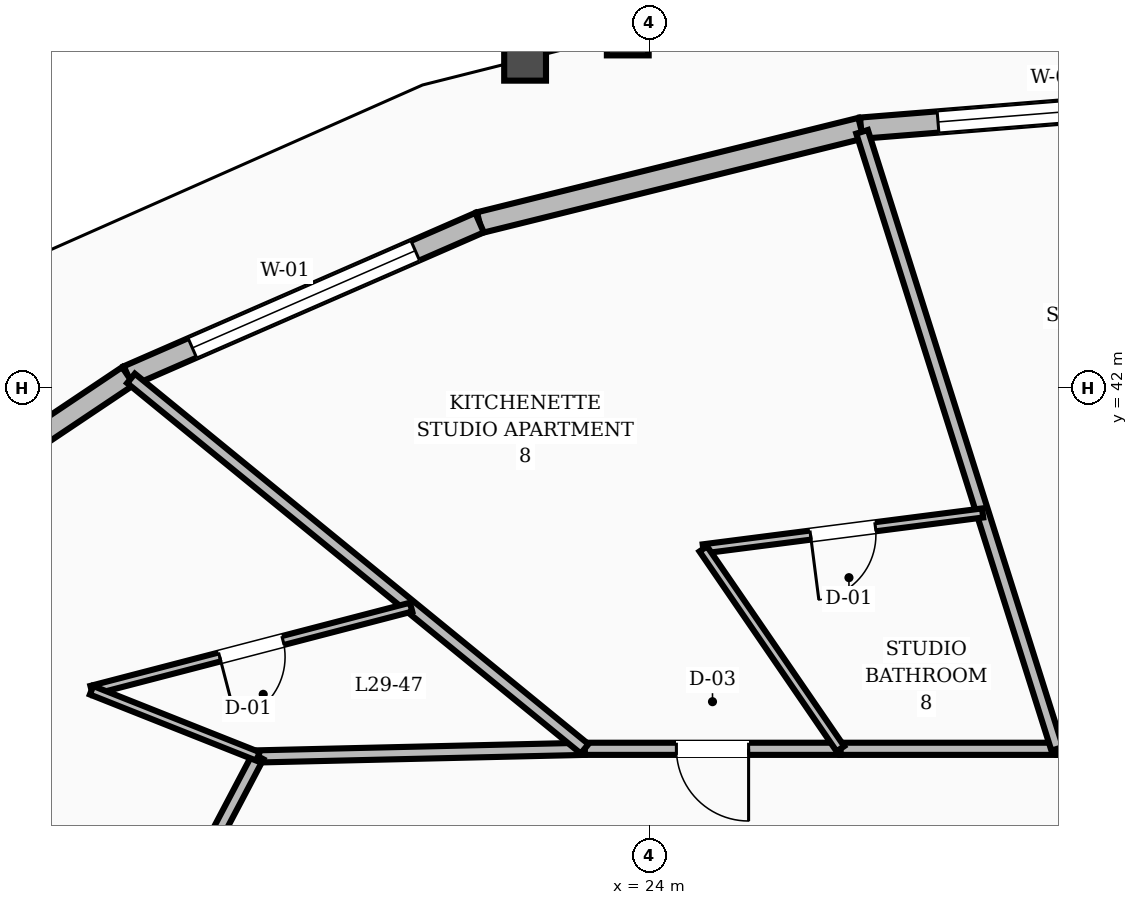
"""IFC4 building model, lengths in metres.
Left out: names, types, materials, properties, quantities, classifications, styles, units other than length and angle.
Written with IfcOpenShell. Run it as: python <this file> out.ifc"""

import sys

from ifc_helpers import new_model, si_unit, direction, frame, frame_2d, origin, place, context, subcontext, project, spatial, rectangle, extrude, element, fill, save


model = new_model("IFC4")
c1 = context("Model", 3, precision=1e-05, world=origin(), true_north=direction((0.0, 1.0)))
c2 = subcontext(c1, "Body", "Model", "MODEL_VIEW")
j1 = project(units=[si_unit("LENGTHUNIT", "METRE"), si_unit("PLANEANGLEUNIT", "RADIAN")], contexts=[c1])
p1 = place(None, origin())
s1 = spatial("IfcSite", under=j1, at=p1, CompositionType="ELEMENT")
p2 = place(p1, origin())
s2 = spatial("IfcBuilding", under=s1, at=p2, CompositionType="ELEMENT")
p3 = place(p2, frame((0.0, 0.0, 117.2)))
s3 = spatial("IfcBuildingStorey", under=s2, at=p3, CompositionType="ELEMENT", Elevation=117.2)
p4 = place(p3, frame((32.0, 45.835, 0.0), z_axis=(0.0, 0.0, 1.0), x_axis=(-0.996781229601, -0.080169696986, 0.0)))
e1 = element("IfcWall", 1, at=p4, inside=s3, PredefinedType="STANDARD", context=c2, shape_type="SweptSolid", body=[
    extrude(rectangle(XDim=5.235, YDim=0.28, at=frame_2d((2.617, 0.0))), origin(), (0.0, 0.0, 1.0), 2.82),
])
p5 = place(p4, frame((1.017, 0.0, 0.8)))
e2 = element("IfcOpeningElement", 2, at=p5, cuts=e1, PredefinedType="OPENING", context=c2, shape_type="SweptSolid", body=[
    extrude(rectangle(XDim=3.2, YDim=1.65, at=frame_2d((1.6, 0.825))), frame((0.0, 0.15, 0.0), z_axis=(0.0, -1.0, 0.0), x_axis=(1.0, 0.0, 0.0)), (0.0, 0.0, 1.0), 0.3),
])
p6 = place(p3, frame((26.782, 45.415, 0.0), z_axis=(0.0, 0.0, 1.0), x_axis=(-0.970681867926, -0.24036786657, 0.0)))
e3 = element("IfcWall", 3, at=p6, inside=s3, PredefinedType="STANDARD", context=c2, shape_type="SweptSolid", body=[
    extrude(rectangle(XDim=5.169, YDim=0.28, at=frame_2d((2.584, 0.0))), origin(), (0.0, 0.0, 1.0), 2.82),
])
p7 = place(p3, frame((21.765, 44.173, 0.0), z_axis=(0.0, 0.0, 1.0), x_axis=(-0.916542280899, -0.39993780432, 0.0)))
e4 = element("IfcWall", 4, at=p7, inside=s3, PredefinedType="STANDARD", context=c2, shape_type="SweptSolid", body=[
    extrude(rectangle(XDim=5.045, YDim=0.28, at=frame_2d((2.523, 0.0))), origin(), (0.0, 0.0, 1.0), 2.82),
])
p8 = place(p7, frame((0.923, 0.0, 0.8)))
e5 = element("IfcOpeningElement", 5, at=p8, cuts=e4, PredefinedType="OPENING", context=c2, shape_type="SweptSolid", body=[
    extrude(rectangle(XDim=3.2, YDim=1.65, at=frame_2d((1.6, 0.825))), frame((0.0, 0.15, 0.0), z_axis=(0.0, -1.0, 0.0), x_axis=(1.0, 0.0, 0.0)), (0.0, 0.0, 1.0), 0.3),
])
p9 = place(p3, frame((17.14, 42.155, 0.0), z_axis=(0.0, 0.0, 1.0), x_axis=(-0.830785482437, -0.556592743549, 0.0)))
e6 = element("IfcWall", 6, at=p9, inside=s3, PredefinedType="STANDARD", context=c2, shape_type="SweptSolid", body=[
    extrude(rectangle(XDim=4.878, YDim=0.28, at=frame_2d((2.439, 0.0))), origin(), (0.0, 0.0, 1.0), 2.82),
])
p10 = place(p3, frame((32.0, 37.25, 0.0), z_axis=(0.0, 0.0, 1.0), x_axis=(-1.0, 0.0, 0.0)))
e7 = element("IfcWall", 7, at=p10, inside=s3, PredefinedType="SOLIDWALL", context=c2, shape_type="SweptSolid", body=[
    extrude(rectangle(XDim=2.635, YDim=0.16, at=frame_2d((1.318, 0.0))), origin(), (0.0, 0.0, 1.0), 2.8),
])
p11 = place(p10, frame((0.843, 0.0, 0.0)))
e8 = element("IfcOpeningElement", 8, at=p11, cuts=e7, PredefinedType="OPENING", context=c2, shape_type="SweptSolid", body=[
    extrude(rectangle(XDim=0.95, YDim=2.1, at=frame_2d((0.475, 1.05))), frame((0.0, 0.09, 0.0), z_axis=(0.0, -1.0, 0.0), x_axis=(1.0, 0.0, 0.0)), (0.0, 0.0, 1.0), 0.18),
])
p12 = place(p3, frame((29.365, 37.25, 0.0), z_axis=(0.0, 0.0, 1.0), x_axis=(-1.0, 0.0, 0.0)))
e9 = element("IfcWall", 9, at=p12, inside=s3, PredefinedType="SOLIDWALL", context=c2, shape_type="SweptSolid", body=[
    extrude(rectangle(XDim=2.853, YDim=0.16, at=frame_2d((1.426, 0.0))), origin(), (0.0, 0.0, 1.0), 2.8),
])
p13 = place(p3, frame((26.512, 37.25, 0.0), z_axis=(0.0, 0.0, 1.0), x_axis=(-1.0, 0.0, 0.0)))
e10 = element("IfcWall", 10, at=p13, inside=s3, PredefinedType="SOLIDWALL", context=c2, shape_type="SweptSolid", body=[
    extrude(rectangle(XDim=3.365, YDim=0.16, at=frame_2d((1.683, 0.0))), origin(), (0.0, 0.0, 1.0), 2.8),
])
p14 = place(p13, frame((1.208, 0.0, 0.0)))
e11 = element("IfcOpeningElement", 11, at=p14, cuts=e10, PredefinedType="OPENING", context=c2, shape_type="SweptSolid", body=[
    extrude(rectangle(XDim=0.95, YDim=2.1, at=frame_2d((0.475, 1.05))), frame((0.0, 0.09, 0.0), z_axis=(0.0, -1.0, 0.0), x_axis=(1.0, 0.0, 0.0)), (0.0, 0.0, 1.0), 0.18),
])
p15 = place(p3, frame((23.146, 37.25, 0.0), z_axis=(0.0, 0.0, 1.0), x_axis=(-0.999728709658, -0.023291781507, 0.0)))
e12 = element("IfcWall", 12, at=p15, inside=s3, PredefinedType="SOLIDWALL", context=c2, shape_type="SweptSolid", body=[
    extrude(rectangle(XDim=4.298, YDim=0.16, at=frame_2d((2.149, 0.0))), origin(), (0.0, 0.0, 1.0), 2.8),
])
p16 = place(p3, frame((18.85, 37.15, 0.0), z_axis=(0.0, 0.0, 1.0), x_axis=(-0.466093963429, -0.884735224378, 0.0)))
e13 = element("IfcWall", 13, at=p16, inside=s3, PredefinedType="SOLIDWALL", context=c2, shape_type="SweptSolid", body=[
    extrude(rectangle(XDim=3.648, YDim=0.16, at=frame_2d((1.824, 0.0))), origin(), (0.0, 0.0, 1.0), 2.8),
])
p17 = place(p16, frame((1.349, 0.0, 0.0)))
e14 = element("IfcOpeningElement", 14, at=p17, cuts=e13, PredefinedType="OPENING", context=c2, shape_type="SweptSolid", body=[
    extrude(rectangle(XDim=0.95, YDim=2.1, at=frame_2d((0.475, 1.05))), frame((0.0, 0.09, 0.0), z_axis=(0.0, -1.0, 0.0), x_axis=(1.0, 0.0, 0.0)), (0.0, 0.0, 1.0), 0.18),
])
p18 = place(p3, frame((29.365, 37.25, 0.0), z_axis=(0.0, 0.0, 1.0), x_axis=(-0.301556782857, 0.953448219209, 0.0)))
e15 = element("IfcWall", 15, at=p18, inside=s3, PredefinedType="SOLIDWALL", context=c2, shape_type="SweptSolid", body=[
    extrude(rectangle(XDim=8.514, YDim=0.16, at=frame_2d((4.257, 0.0))), origin(), (0.0, 0.0, 1.0), 2.8),
])
p19 = place(p3, frame((28.383, 40.353, 0.0), z_axis=(0.0, 0.0, 1.0), x_axis=(-0.991848389459, -0.127423594076, 0.0)))
e16 = element("IfcWall", 16, at=p19, inside=s3, PredefinedType="PARTITIONING", context=c2, shape_type="SweptSolid", body=[
    extrude(rectangle(XDim=3.706, YDim=0.12, at=frame_2d((1.853, 0.0))), origin(), (0.0, 0.0, 1.0), 2.8),
])
p20 = place(p19, frame((1.423, 0.0, 0.0)))
e17 = element("IfcOpeningElement", 17, at=p20, cuts=e16, PredefinedType="OPENING", context=c2, shape_type="SweptSolid", body=[
    extrude(rectangle(XDim=0.86, YDim=2.1, at=frame_2d((0.43, 1.05))), frame((0.0, 0.07, 0.0), z_axis=(0.0, -1.0, 0.0), x_axis=(1.0, 0.0, 0.0)), (0.0, 0.0, 1.0), 0.14),
])
p21 = place(p3, frame((26.512, 37.25, 0.0), z_axis=(0.0, 0.0, 1.0), x_axis=(-0.565550666982, 0.824713552136, 0.0)))
e18 = element("IfcWall", 18, at=p21, inside=s3, PredefinedType="PARTITIONING", context=c2, shape_type="SweptSolid", body=[
    extrude(rectangle(XDim=3.19, YDim=0.12, at=frame_2d((1.595, 0.0))), origin(), (0.0, 0.0, 1.0), 2.8),
])
p22 = place(p3, frame((23.146, 37.25, 0.0), z_axis=(0.0, 0.0, 1.0), x_axis=(-0.774531610093, 0.632535204528, 0.0)))
e19 = element("IfcWall", 19, at=p22, inside=s3, PredefinedType="SOLIDWALL", context=c2, shape_type="SweptSolid", body=[
    extrude(rectangle(XDim=7.704, YDim=0.16, at=frame_2d((3.852, 0.0))), origin(), (0.0, 0.0, 1.0), 2.8),
])
p23 = place(p3, frame((20.864, 39.114, 0.0), z_axis=(0.0, 0.0, 1.0), x_axis=(-0.967784171798, -0.251781247947, 0.0)))
e20 = element("IfcWall", 20, at=p23, inside=s3, PredefinedType="PARTITIONING", context=c2, shape_type="SweptSolid", body=[
    extrude(rectangle(XDim=4.344, YDim=0.12, at=frame_2d((2.172, 0.0))), origin(), (0.0, 0.0, 1.0), 2.8),
])
p24 = place(p23, frame((1.742, 0.0, 0.0)))
e21 = element("IfcOpeningElement", 21, at=p24, cuts=e20, PredefinedType="OPENING", context=c2, shape_type="SweptSolid", body=[
    extrude(rectangle(XDim=0.86, YDim=2.1, at=frame_2d((0.43, 1.05))), frame((0.0, 0.07, 0.0), z_axis=(0.0, -1.0, 0.0), x_axis=(1.0, 0.0, 0.0)), (0.0, 0.0, 1.0), 0.14),
])
p25 = place(p3, frame((18.85, 37.15, 0.0), z_axis=(0.0, 0.0, 1.0), x_axis=(-0.929331632403, 0.369246146921, 0.0)))
e22 = element("IfcWall", 22, at=p25, inside=s3, PredefinedType="PARTITIONING", context=c2, shape_type="SweptSolid", body=[
    extrude(rectangle(XDim=2.356, YDim=0.12, at=frame_2d((1.178, 0.0))), origin(), (0.0, 0.0, 1.0), 2.8),
])
p26 = place(p5, origin())
e23 = element("IfcWindow", 23, at=p26, inside=s3, PartitioningType="SINGLE_PANEL", PredefinedType="WINDOW", context=c2, shape_type="SweptSolid", body=[
    extrude(rectangle(XDim=3.2, YDim=1.65, at=frame_2d((1.6, 0.825))), frame((0.0, 0.03, 0.0), z_axis=(0.0, -1.0, 0.0), x_axis=(1.0, 0.0, 0.0)), (0.0, 0.0, 1.0), 0.06),
])
fill(e2, e23)
p27 = place(p8, origin())
e24 = element("IfcWindow", 24, at=p27, inside=s3, PartitioningType="SINGLE_PANEL", PredefinedType="WINDOW", context=c2, shape_type="SweptSolid", body=[
    extrude(rectangle(XDim=3.2, YDim=1.65, at=frame_2d((1.6, 0.825))), frame((0.0, 0.03, 0.0), z_axis=(0.0, -1.0, 0.0), x_axis=(1.0, 0.0, 0.0)), (0.0, 0.0, 1.0), 0.06),
])
fill(e5, e24)
p28 = place(p20, origin())
e25 = element("IfcDoor", 25, at=p28, inside=s3, OperationType="SINGLE_SWING_RIGHT", PredefinedType="DOOR", context=c2, shape_type="SweptSolid", body=[
    extrude(rectangle(XDim=0.86, YDim=2.1, at=frame_2d((0.43, 1.05))), frame((0.0, 0.025, 0.0), z_axis=(0.0, -1.0, 0.0), x_axis=(1.0, 0.0, 0.0)), (0.0, 0.0, 1.0), 0.05),
])
fill(e17, e25)
p29 = place(p14, origin())
e26 = element("IfcDoor", 26, at=p29, inside=s3, OperationType="SINGLE_SWING_LEFT", PredefinedType="DOOR", context=c2, shape_type="SweptSolid", body=[
    extrude(rectangle(XDim=0.95, YDim=2.1, at=frame_2d((0.475, 1.05))), frame((0.0, 0.025, 0.0), z_axis=(0.0, -1.0, 0.0), x_axis=(1.0, 0.0, 0.0)), (0.0, 0.0, 1.0), 0.05),
])
fill(e11, e26)
p30 = place(p24, origin())
e27 = element("IfcDoor", 27, at=p30, inside=s3, OperationType="SINGLE_SWING_RIGHT", PredefinedType="DOOR", context=c2, shape_type="SweptSolid", body=[
    extrude(rectangle(XDim=0.86, YDim=2.1, at=frame_2d((0.43, 1.05))), frame((0.0, 0.025, 0.0), z_axis=(0.0, -1.0, 0.0), x_axis=(1.0, 0.0, 0.0)), (0.0, 0.0, 1.0), 0.05),
])
fill(e21, e27)
save(model, sys.argv[1])
